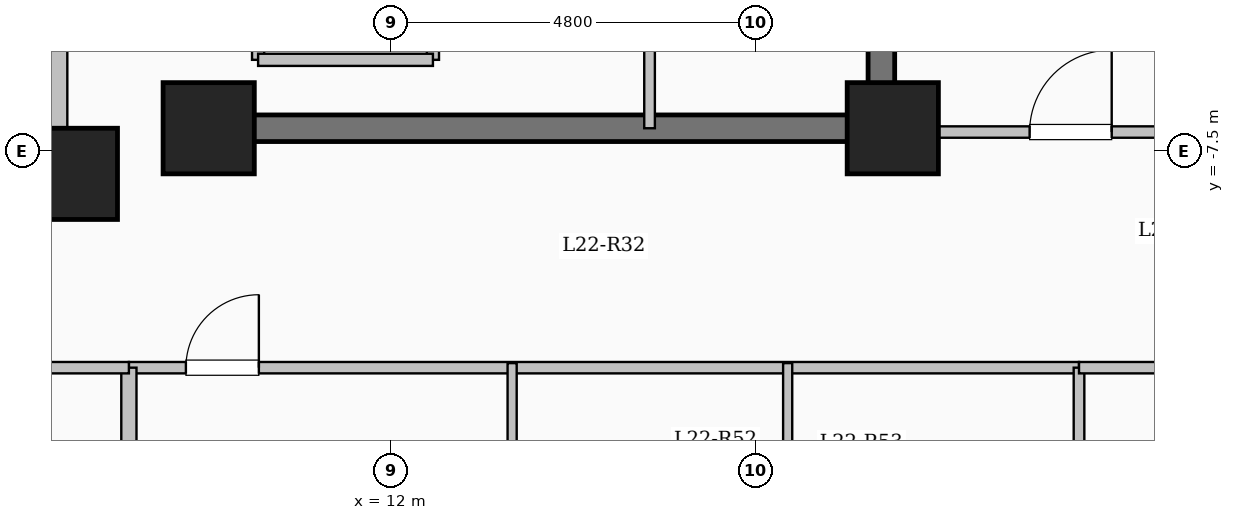
"""IFC4 building model, lengths in metres.
Left out: names, types, materials, properties, quantities, classifications, styles, units other than length and angle.
Written with IfcOpenShell. Run it as: python <this file> out.ifc"""

import sys

from ifc_helpers import new_model, si_unit, direction, frame, frame_2d, origin, origin_2d, place, context, subcontext, project, spatial, rectangle, extrude, element, fill, save


model = new_model("IFC4")
c1 = context("Model", 3, precision=1e-05, world=origin(), true_north=direction((0.0, 1.0)))
c2 = subcontext(c1, "Body", "Model", "MODEL_VIEW")
j1 = project(units=[si_unit("LENGTHUNIT", "METRE"), si_unit("PLANEANGLEUNIT", "RADIAN")], contexts=[c1])
p1 = place(None, origin())
s1 = spatial("IfcSite", under=j1, at=p1, CompositionType="ELEMENT")
p2 = place(p1, origin())
s2 = spatial("IfcBuilding", under=s1, at=p2, CompositionType="ELEMENT")
p3 = place(p2, frame((0.0, 0.0, 85.0)))
s3 = spatial("IfcBuildingStorey", under=s2, at=p3, CompositionType="ELEMENT", Elevation=85.0)
for number, where, z_axis, x_axis in (
    (1, (7.8, -7.8, 0.0), (0.0, 0.0, 1.0), (1.0, 0.0, 0.0)),
    (2, (9.6, -7.2, 0.0), (0.0, 0.0, 1.0), (1.0, 0.0, 0.0)),
    (3, (18.6, -7.2, 0.0), (0.0, 0.0, 1.0), (1.0, 0.0, 0.0)),
):
    element("IfcColumn", number, at=place(p3, frame(where, z_axis=z_axis, x_axis=x_axis)), inside=s3, PredefinedType="COLUMN", context=c2, shape_type="SweptSolid", body=[
        extrude(rectangle(XDim=1.2, YDim=1.2, at=origin_2d()), origin(), (0.0, 0.0, 1.0), 3.35),
    ])
p4 = place(p3, frame((-7.62, -7.62, 0.0), z_axis=(0.0, 0.0, 1.0), x_axis=(1.0, 0.0, 0.0)))
e4 = element("IfcWall", 4, at=p4, inside=s3, PredefinedType="SOLIDWALL", context=c2, shape_type="SweptSolid", body=[
    extrude(rectangle(XDim=15.24, YDim=0.24, at=frame_2d((7.62, 0.0))), origin(), (0.0, 0.0, 1.0), 3.1),
])
p5 = place(p4, frame((6.92, 0.0, 0.95)))
e5 = element("IfcOpeningElement", 5, at=p5, cuts=e4, PredefinedType="OPENING", context=c2, shape_type="SweptSolid", body=[
    extrude(rectangle(XDim=1.4, YDim=1.5, at=frame_2d((0.7, 0.75))), frame((0.0, 0.13, 0.0), z_axis=(0.0, -1.0, 0.0), x_axis=(1.0, 0.0, 0.0)), (0.0, 0.0, 1.0), 0.26),
])
p6 = place(p3, frame((7.62, -7.62, 0.0), z_axis=(0.0, 0.0, 1.0), x_axis=(0.0, 1.0, 0.0)))
e6 = element("IfcWall", 6, at=p6, inside=s3, PredefinedType="SOLIDWALL", context=c2, shape_type="SweptSolid", body=[
    extrude(rectangle(XDim=15.24, YDim=0.24, at=frame_2d((7.62, 0.0))), origin(), (0.0, 0.0, 1.0), 3.1),
])
p7 = place(p6, frame((6.92, 0.0, 0.95)))
e7 = element("IfcOpeningElement", 7, at=p7, cuts=e6, PredefinedType="OPENING", context=c2, shape_type="SweptSolid", body=[
    extrude(rectangle(XDim=1.4, YDim=1.5, at=frame_2d((0.7, 0.75))), frame((0.0, 0.13, 0.0), z_axis=(0.0, -1.0, 0.0), x_axis=(1.0, 0.0, 0.0)), (0.0, 0.0, 1.0), 0.26),
])
p8 = place(p3, frame((10.25, -6.3, 0.0), z_axis=(0.0, 0.0, 1.0), x_axis=(0.0, 1.0, 0.0)))
e8 = element("IfcWall", 8, at=p8, inside=s3, PredefinedType="SOLIDWALL", context=c2, shape_type="SweptSolid", body=[
    extrude(rectangle(XDim=2.6, YDim=0.16, at=frame_2d((1.3, 0.0))), origin(), (0.0, 0.0, 1.0), 3.1),
])
p9 = place(p8, frame((0.75, 0.0, 0.0)))
e9 = element("IfcOpeningElement", 9, at=p9, cuts=e8, PredefinedType="OPENING", context=c2, shape_type="SweptSolid", body=[
    extrude(rectangle(XDim=1.1, YDim=2.15, at=frame_2d((0.55, 1.075))), frame((0.0, 0.09, 0.0), z_axis=(0.0, -1.0, 0.0), x_axis=(1.0, 0.0, 0.0)), (0.0, 0.0, 1.0), 0.18),
])
p10 = place(p3, frame((12.55, -6.3, 0.0), z_axis=(0.0, 0.0, 1.0), x_axis=(0.0, 1.0, 0.0)))
e10 = element("IfcWall", 10, at=p10, inside=s3, PredefinedType="SOLIDWALL", context=c2, shape_type="SweptSolid", body=[
    extrude(rectangle(XDim=2.6, YDim=0.16, at=frame_2d((1.3, 0.0))), origin(), (0.0, 0.0, 1.0), 3.1),
])
p11 = place(p3, frame((10.25, -6.3, 0.0), z_axis=(0.0, 0.0, 1.0), x_axis=(1.0, 0.0, 0.0)))
e11 = element("IfcWall", 11, at=p11, inside=s3, PredefinedType="SOLIDWALL", context=c2, shape_type="SweptSolid", body=[
    extrude(rectangle(XDim=2.3, YDim=0.16, at=frame_2d((1.15, 0.0))), origin(), (0.0, 0.0, 1.0), 3.1),
])
p12 = place(p3, frame((18.45, -7.375, 0.0), z_axis=(0.0, 0.0, 1.0), x_axis=(0.0, 1.0, 0.0)))
e12 = element("IfcWall", 12, at=p12, inside=s3, PredefinedType="SHEAR", context=c2, shape_type="SweptSolid", body=[
    extrude(rectangle(XDim=14.05, YDim=0.35, at=frame_2d((7.025, 0.0))), origin(), (0.0, 0.0, 1.0), 3.35),
])
p13 = place(p3, frame((10.075, -7.2, 0.0), z_axis=(0.0, 0.0, 1.0), x_axis=(1.0, 0.0, 0.0)))
e13 = element("IfcWall", 13, at=p13, inside=s3, PredefinedType="SHEAR", context=c2, shape_type="SweptSolid", body=[
    extrude(rectangle(XDim=8.55, YDim=0.35, at=frame_2d((4.275, 0.0))), origin(), (0.0, 0.0, 1.0), 3.35),
])
p14 = place(p3, frame((15.4, -7.2, 0.0), z_axis=(0.0, 0.0, 1.0), x_axis=(0.0, 1.0, 0.0)))
e14 = element("IfcWall", 14, at=p14, inside=s3, PredefinedType="PARTITIONING", context=c2, shape_type="SweptSolid", body=[
    extrude(rectangle(XDim=10.45, YDim=0.14, at=frame_2d((5.225, 0.0))), origin(), (0.0, 0.0, 1.0), 3.1),
])
p15 = place(p14, frame((9.25, 0.0, 0.0)))
e15 = element("IfcOpeningElement", 15, at=p15, cuts=e14, PredefinedType="OPENING", context=c2, shape_type="SweptSolid", body=[
    extrude(rectangle(XDim=0.9, YDim=2.08, at=frame_2d((0.45, 1.04))), frame((0.0, 0.08, 0.0), z_axis=(0.0, -1.0, 0.0), x_axis=(1.0, 0.0, 0.0)), (0.0, 0.0, 1.0), 0.16),
])
p16 = place(p3, frame((8.55, -10.35, 0.0), z_axis=(0.0, 0.0, 1.0), x_axis=(1.0, 0.0, 0.0)))
e16 = element("IfcWall", 16, at=p16, inside=s3, PredefinedType="PARTITIONING", context=c2, shape_type="SweptSolid", body=[
    extrude(rectangle(XDim=12.5, YDim=0.15, at=frame_2d((6.25, 0.0))), origin(), (0.0, 0.0, 1.0), 3.1),
])
p17 = place(p16, frame((0.75, 0.0, 0.0)))
e17 = element("IfcOpeningElement", 17, at=p17, cuts=e16, PredefinedType="OPENING", context=c2, shape_type="SweptSolid", body=[
    extrude(rectangle(XDim=0.96, YDim=2.15, at=frame_2d((0.48, 1.075))), frame((0.0, 0.085, 0.0), z_axis=(0.0, -1.0, 0.0), x_axis=(1.0, 0.0, 0.0)), (0.0, 0.0, 1.0), 0.17),
])
p18 = place(p3, frame((13.592, -22.1, 0.0), z_axis=(0.0, 0.0, 1.0), x_axis=(0.0, 1.0, 0.0)))
e18 = element("IfcWall", 18, at=p18, inside=s3, PredefinedType="PARTITIONING", context=c2, shape_type="SweptSolid", body=[
    extrude(rectangle(XDim=11.81, YDim=0.12, at=frame_2d((5.905, 0.0))), origin(), (0.0, 0.0, 1.0), 3.1),
])
p19 = place(p18, frame((7.475, 0.0, 0.0)))
e19 = element("IfcOpeningElement", 19, at=p19, cuts=e18, PredefinedType="OPENING", context=c2, shape_type="SweptSolid", body=[
    extrude(rectangle(XDim=1.08, YDim=2.15, at=frame_2d((0.54, 1.075))), frame((0.0, 0.07, 0.0), z_axis=(0.0, -1.0, 0.0), x_axis=(1.0, 0.0, 0.0)), (0.0, 0.0, 1.0), 0.14),
])
p20 = place(p3, frame((17.217, -13.26, 0.0), z_axis=(0.0, 0.0, 1.0), x_axis=(0.0, 1.0, 0.0)))
e20 = element("IfcWall", 20, at=p20, inside=s3, PredefinedType="PARTITIONING", context=c2, shape_type="SweptSolid", body=[
    extrude(rectangle(XDim=2.97, YDim=0.12, at=frame_2d((1.485, 0.0))), origin(), (0.0, 0.0, 1.0), 3.1),
])
p21 = place(p3, frame((8.55, -22.704, 0.0), z_axis=(0.0, 0.0, 1.0), x_axis=(0.0, 1.0, 0.0)))
e21 = element("IfcWall", 21, at=p21, inside=s3, PredefinedType="SOLIDWALL", context=c2, shape_type="SweptSolid", body=[
    extrude(rectangle(XDim=12.354, YDim=0.2, at=frame_2d((6.177, 0.0))), origin(), (0.0, 0.0, 1.0), 3.1),
])
p22 = place(p3, frame((-8.55, -10.35, 0.0), z_axis=(0.0, 0.0, 1.0), x_axis=(1.0, 0.0, 0.0)))
e22 = element("IfcWall", 22, at=p22, inside=s3, PredefinedType="PARTITIONING", context=c2, shape_type="SweptSolid", body=[
    extrude(rectangle(XDim=17.1, YDim=0.15, at=frame_2d((8.55, 0.0))), origin(), (0.0, 0.0, 1.0), 3.1),
])
p23 = place(p22, frame((1.15, 0.0, 0.0)))
e23 = element("IfcOpeningElement", 23, at=p23, cuts=e22, PredefinedType="OPENING", context=c2, shape_type="SweptSolid", body=[
    extrude(rectangle(XDim=0.96, YDim=2.15, at=frame_2d((0.48, 1.075))), frame((0.0, 0.085, 0.0), z_axis=(0.0, -1.0, 0.0), x_axis=(1.0, 0.0, 0.0)), (0.0, 0.0, 1.0), 0.17),
])
p24 = place(p22, frame((10.5, 0.0, 0.0)))
e24 = element("IfcOpeningElement", 24, at=p24, cuts=e22, PredefinedType="OPENING", context=c2, shape_type="SweptSolid", body=[
    extrude(rectangle(XDim=0.96, YDim=2.15, at=frame_2d((0.48, 1.075))), frame((0.0, 0.085, 0.0), z_axis=(0.0, -1.0, 0.0), x_axis=(1.0, 0.0, 0.0)), (0.0, 0.0, 1.0), 0.17),
])
p25 = place(p3, frame((18.45, -7.25, 0.0), z_axis=(0.0, 0.0, 1.0), x_axis=(1.0, 0.0, 0.0)))
e25 = element("IfcWall", 25, at=p25, inside=s3, PredefinedType="PARTITIONING", context=c2, shape_type="SweptSolid", body=[
    extrude(rectangle(XDim=8.43, YDim=0.15, at=frame_2d((4.215, 0.0))), origin(), (0.0, 0.0, 1.0), 3.1),
])
p26 = place(p25, frame((1.95, 0.0, 0.0)))
e26 = element("IfcOpeningElement", 26, at=p26, cuts=e25, PredefinedType="OPENING", context=c2, shape_type="SweptSolid", body=[
    extrude(rectangle(XDim=1.08, YDim=2.15, at=frame_2d((0.54, 1.075))), frame((0.0, 0.085, 0.0), z_axis=(0.0, -1.0, 0.0), x_axis=(1.0, 0.0, 0.0)), (0.0, 0.0, 1.0), 0.17),
])
p27 = place(p3, frame((21.05, -17.85, 0.0), z_axis=(0.0, 0.0, 1.0), x_axis=(0.0, 1.0, 0.0)))
e27 = element("IfcWall", 27, at=p27, inside=s3, PredefinedType="PARTITIONING", context=c2, shape_type="SweptSolid", body=[
    extrude(rectangle(XDim=7.5, YDim=0.14, at=frame_2d((3.75, 0.0))), origin(), (0.0, 0.0, 1.0), 3.1),
])
p28 = place(p3, frame((21.05, -10.35, 0.0), z_axis=(0.0, 0.0, 1.0), x_axis=(1.0, 0.0, 0.0)))
e28 = element("IfcWall", 28, at=p28, inside=s3, PredefinedType="PARTITIONING", context=c2, shape_type="SweptSolid", body=[
    extrude(rectangle(XDim=5.83, YDim=0.15, at=frame_2d((2.915, 0.0))), origin(), (0.0, 0.0, 1.0), 3.1),
])
p29 = place(p28, frame((2.44, 0.0, 0.0)))
e29 = element("IfcOpeningElement", 29, at=p29, cuts=e28, PredefinedType="OPENING", context=c2, shape_type="SweptSolid", body=[
    extrude(rectangle(XDim=0.95, YDim=2.15, at=frame_2d((0.475, 1.075))), frame((0.0, 0.085, 0.0), z_axis=(0.0, -1.0, 0.0), x_axis=(1.0, 0.0, 0.0)), (0.0, 0.0, 1.0), 0.17),
])
p30 = place(p17, origin())
e30 = element("IfcDoor", 30, at=p30, inside=s3, OperationType="SINGLE_SWING_RIGHT", PredefinedType="DOOR", context=c2, shape_type="SweptSolid", body=[
    extrude(rectangle(XDim=0.96, YDim=2.15, at=frame_2d((0.48, 1.075))), frame((0.0, 0.025, 0.0), z_axis=(0.0, -1.0, 0.0), x_axis=(1.0, 0.0, 0.0)), (0.0, 0.0, 1.0), 0.05),
])
fill(e17, e30)
p31 = place(p26, origin())
e31 = element("IfcDoor", 31, at=p31, inside=s3, OperationType="SINGLE_SWING_RIGHT", PredefinedType="DOOR", context=c2, shape_type="SweptSolid", body=[
    extrude(rectangle(XDim=1.08, YDim=2.15, at=frame_2d((0.54, 1.075))), frame((0.0, 0.025, 0.0), z_axis=(0.0, -1.0, 0.0), x_axis=(1.0, 0.0, 0.0)), (0.0, 0.0, 1.0), 0.05),
])
fill(e26, e31)
save(model, sys.argv[1])
